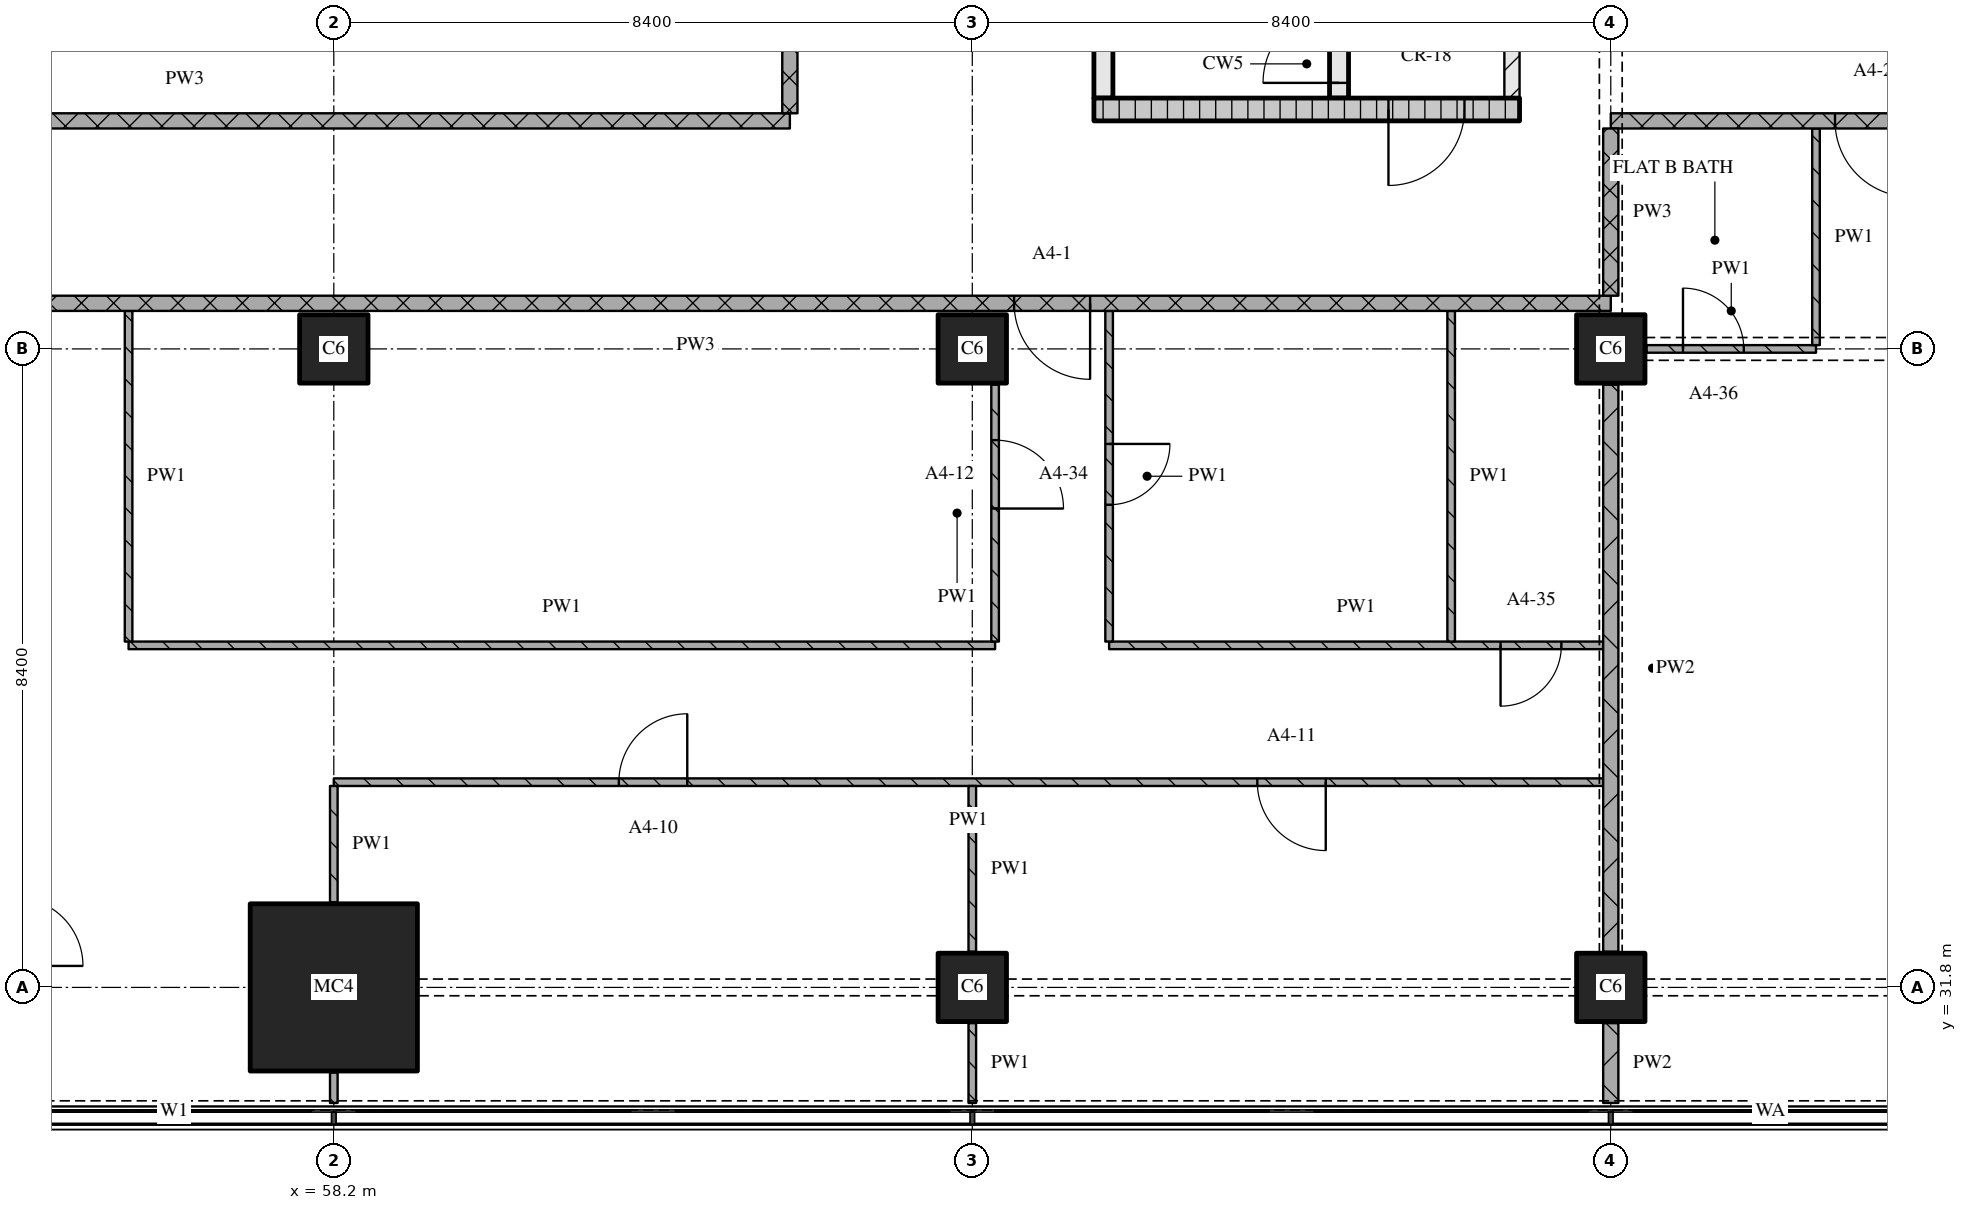
"""IFC4 building model, lengths in metres.
Left out: names, types, materials, properties, quantities, classifications, styles, units other than length and angle.
Written with IfcOpenShell. Run it as: python <this file> out.ifc"""

import sys

from ifc_helpers import new_model, si_unit, direction, frame, frame_2d, origin, origin_2d, place, context, subcontext, project, spatial, rectangle, extrude, element, fill, save


model = new_model("IFC4")
c1 = context("Model", 3, precision=1e-05, world=origin(), true_north=direction((0.0, 1.0)))
c2 = subcontext(c1, "Body", "Model", "MODEL_VIEW")
j1 = project(units=[si_unit("LENGTHUNIT", "METRE"), si_unit("PLANEANGLEUNIT", "RADIAN")], contexts=[c1])
p1 = place(None, origin())
s1 = spatial("IfcSite", under=j1, at=p1, CompositionType="ELEMENT")
p2 = place(p1, origin())
s2 = spatial("IfcBuilding", under=s1, at=p2, CompositionType="ELEMENT")
p3 = place(p2, frame((0.0, 0.0, 73.2)))
s3 = spatial("IfcBuildingStorey", under=s2, at=p3, CompositionType="ELEMENT", Elevation=73.2)
p4 = place(p3, frame((58.2, 31.8, 0.0), z_axis=(0.0, 0.0, 1.0), x_axis=(1.0, 0.0, 0.0)))
e1 = element("IfcColumn", 1, at=p4, inside=s3, PredefinedType="COLUMN", context=c2, shape_type="SweptSolid", body=[
    extrude(rectangle(XDim=2.2, YDim=2.2, at=origin_2d()), origin(), (0.0, 0.0, 1.0), 3.6),
])
for number, where, z_axis, x_axis in (
    (2, (58.2, 40.2, 0.0), (0.0, 0.0, 1.0), (1.0, 0.0, 0.0)),
    (3, (66.6, 31.8, 0.0), (0.0, 0.0, 1.0), (1.0, 0.0, 0.0)),
    (4, (66.6, 40.2, 0.0), (0.0, 0.0, 1.0), (1.0, 0.0, 0.0)),
    (5, (75.0, 31.8, 0.0), (0.0, 0.0, 1.0), (1.0, 0.0, 0.0)),
    (6, (75.0, 40.2, 0.0), (0.0, 0.0, 1.0), (1.0, 0.0, 0.0)),
):
    element("IfcColumn", number, at=place(p3, frame(where, z_axis=z_axis, x_axis=x_axis)), inside=s3, PredefinedType="COLUMN", context=c2, shape_type="SweptSolid", body=[
        extrude(rectangle(XDim=0.9, YDim=0.9, at=origin_2d()), origin(), (0.0, 0.0, 1.0), 3.6),
    ])
p5 = place(p3, frame((68.2, 43.35, 0.0), z_axis=(0.0, 0.0, 1.0), x_axis=(1.0, 0.0, 0.0)))
e7 = element("IfcWall", 7, at=p5, inside=s3, PredefinedType="SOLIDWALL", context=c2, shape_type="SweptSolid", body=[
    extrude(rectangle(XDim=5.6, YDim=0.3, at=frame_2d((2.8, 0.0))), origin(), (0.0, 0.0, 1.0), 3.32),
])
p6 = place(p5, frame((3.875, 0.0, 0.0)))
e8 = element("IfcOpeningElement", 8, at=p6, cuts=e7, PredefinedType="OPENING", context=c2, shape_type="SweptSolid", body=[
    extrude(rectangle(XDim=1.0, YDim=2.1, at=frame_2d((0.5, 1.05))), frame((0.0, 0.16, 0.0), z_axis=(0.0, -1.0, 0.0), x_axis=(1.0, 0.0, 0.0)), (0.0, 0.0, 1.0), 0.32),
])
p7 = place(p3, frame((68.325, 43.5, 0.0), z_axis=(0.0, 0.0, 1.0), x_axis=(0.0, 1.0, 0.0)))
e9 = element("IfcWall", 9, at=p7, inside=s3, PredefinedType="SOLIDWALL", context=c2, shape_type="SweptSolid", body=[
    extrude(rectangle(XDim=6.9, YDim=0.25, at=frame_2d((3.45, 0.0))), origin(), (0.0, 0.0, 1.0), 3.32),
])
p8 = place(p3, frame((71.425, 43.5, 0.0), z_axis=(0.0, 0.0, 1.0), x_axis=(0.0, 1.0, 0.0)))
e10 = element("IfcWall", 10, at=p8, inside=s3, PredefinedType="SOLIDWALL", context=c2, shape_type="SweptSolid", body=[
    extrude(rectangle(XDim=6.9, YDim=0.25, at=frame_2d((3.45, 0.0))), origin(), (0.0, 0.0, 1.0), 3.32),
])
p9 = place(p8, frame((0.2, 0.0, 0.0)))
e11 = element("IfcOpeningElement", 11, at=p9, cuts=e10, PredefinedType="OPENING", context=c2, shape_type="SweptSolid", body=[
    extrude(rectangle(XDim=1.0, YDim=2.1, at=frame_2d((0.5, 1.05))), frame((0.0, 0.135, 0.0), z_axis=(0.0, -1.0, 0.0), x_axis=(1.0, 0.0, 0.0)), (0.0, 0.0, 1.0), 0.27),
])
p10 = place(p3, frame((73.7, 43.5, 0.0), z_axis=(0.0, 0.0, 1.0), x_axis=(0.0, 1.0, 0.0)))
e12 = element("IfcWall", 12, at=p10, inside=s3, PredefinedType="PARTITIONING", context=c2, shape_type="SweptSolid", body=[
    extrude(rectangle(XDim=6.9, YDim=0.2, at=frame_2d((3.45, 0.0))), origin(), (0.0, 0.0, 1.0), 3.32),
])
p11 = place(p10, frame((1.0, 0.0, 0.0)))
e13 = element("IfcOpeningElement", 13, at=p11, cuts=e12, PredefinedType="OPENING", context=c2, shape_type="SweptSolid", body=[
    extrude(rectangle(XDim=1.0, YDim=2.1, at=frame_2d((0.5, 1.05))), frame((0.0, 0.11, 0.0), z_axis=(0.0, -1.0, 0.0), x_axis=(1.0, 0.0, 0.0)), (0.0, 0.0, 1.0), 0.22),
])
p12 = place(p3, frame((74.9, 34.5, 0.0), z_axis=(0.0, 0.0, 1.0), x_axis=(-1.0, 0.0, 0.0)))
e14 = element("IfcWall", 14, at=p12, inside=s3, PredefinedType="PARTITIONING", context=c2, shape_type="SweptSolid", body=[
    extrude(rectangle(XDim=16.7, YDim=0.1, at=frame_2d((8.35, 0.0))), origin(), (0.0, 0.0, 1.0), 3.32),
])
p13 = place(p12, frame((3.65, 0.0, 0.0)))
e15 = element("IfcOpeningElement", 15, at=p13, cuts=e14, PredefinedType="OPENING", context=c2, shape_type="SweptSolid", body=[
    extrude(rectangle(XDim=0.9, YDim=2.1, at=frame_2d((0.45, 1.05))), frame((0.0, 0.06, 0.0), z_axis=(0.0, -1.0, 0.0), x_axis=(1.0, 0.0, 0.0)), (0.0, 0.0, 1.0), 0.12),
])
p14 = place(p12, frame((12.05, 0.0, 0.0)))
e16 = element("IfcOpeningElement", 16, at=p14, cuts=e14, PredefinedType="OPENING", context=c2, shape_type="SweptSolid", body=[
    extrude(rectangle(XDim=0.9, YDim=2.1, at=frame_2d((0.45, 1.05))), frame((0.0, 0.06, 0.0), z_axis=(0.0, -1.0, 0.0), x_axis=(1.0, 0.0, 0.0)), (0.0, 0.0, 1.0), 0.12),
])
p15 = place(p3, frame((55.5, 36.3, 0.0), z_axis=(0.0, 0.0, 1.0), x_axis=(1.0, 0.0, 0.0)))
e17 = element("IfcWall", 17, at=p15, inside=s3, PredefinedType="PARTITIONING", context=c2, shape_type="SweptSolid", body=[
    extrude(rectangle(XDim=11.4, YDim=0.1, at=frame_2d((5.7, 0.0))), origin(), (0.0, 0.0, 1.0), 3.32),
])
p16 = place(p3, frame((68.4, 36.3, 0.0), z_axis=(0.0, 0.0, 1.0), x_axis=(1.0, 0.0, 0.0)))
e18 = element("IfcWall", 18, at=p16, inside=s3, PredefinedType="PARTITIONING", context=c2, shape_type="SweptSolid", body=[
    extrude(rectangle(XDim=6.5, YDim=0.1, at=frame_2d((3.25, 0.0))), origin(), (0.0, 0.0, 1.0), 3.32),
])
p17 = place(p16, frame((5.15, 0.0, 0.0)))
e19 = element("IfcOpeningElement", 19, at=p17, cuts=e18, PredefinedType="OPENING", context=c2, shape_type="SweptSolid", body=[
    extrude(rectangle(XDim=0.8, YDim=2.1, at=frame_2d((0.4, 1.05))), frame((0.0, 0.06, 0.0), z_axis=(0.0, -1.0, 0.0), x_axis=(1.0, 0.0, 0.0)), (0.0, 0.0, 1.0), 0.12),
])
p18 = place(p3, frame((75.47, 40.2, 0.0), z_axis=(0.0, 0.0, 1.0), x_axis=(1.0, 0.0, 0.0)))
e20 = element("IfcWall", 20, at=p18, inside=s3, PredefinedType="PARTITIONING", context=c2, shape_type="SweptSolid", body=[
    extrude(rectangle(XDim=2.23, YDim=0.1, at=frame_2d((1.115, 0.0))), origin(), (0.0, 0.0, 1.0), 2.83),
])
p19 = place(p18, frame((0.48, 0.0, 0.0)))
e21 = element("IfcOpeningElement", 21, at=p19, cuts=e20, PredefinedType="OPENING", context=c2, shape_type="SweptSolid", body=[
    extrude(rectangle(XDim=0.8, YDim=2.1, at=frame_2d((0.4, 1.05))), frame((0.0, 0.06, 0.0), z_axis=(0.0, -1.0, 0.0), x_axis=(1.0, 0.0, 0.0)), (0.0, 0.0, 1.0), 0.12),
])
p20 = place(p3, frame((75.0, 40.8, 0.0), z_axis=(0.0, 0.0, 1.0), x_axis=(-1.0, 0.0, 0.0)))
e22 = element("IfcWall", 22, at=p20, inside=s3, PredefinedType="PARTITIONING", context=c2, shape_type="SweptSolid", body=[
    extrude(rectangle(XDim=24.08, YDim=0.2, at=frame_2d((12.04, 0.0))), origin(), (0.0, 0.0, 1.0), 3.32),
])
p21 = place(p20, frame((6.85, 0.0, 0.0)))
e23 = element("IfcOpeningElement", 23, at=p21, cuts=e22, PredefinedType="OPENING", context=c2, shape_type="SweptSolid", body=[
    extrude(rectangle(XDim=1.0, YDim=2.1, at=frame_2d((0.5, 1.05))), frame((0.0, 0.11, 0.0), z_axis=(0.0, -1.0, 0.0), x_axis=(1.0, 0.0, 0.0)), (0.0, 0.0, 1.0), 0.22),
])
p22 = place(p3, frame((48.28, 43.2, 0.0), z_axis=(0.0, 0.0, 1.0), x_axis=(1.0, 0.0, 0.0)))
e24 = element("IfcWall", 24, at=p22, inside=s3, PredefinedType="PARTITIONING", context=c2, shape_type="SweptSolid", body=[
    extrude(rectangle(XDim=15.92, YDim=0.2, at=frame_2d((7.96, 0.0))), origin(), (0.0, 0.0, 1.0), 3.32),
])
p23 = place(p3, frame((100.2, 43.2, 0.0), z_axis=(0.0, 0.0, 1.0), x_axis=(-1.0, 0.0, 0.0)))
e25 = element("IfcWall", 25, at=p23, inside=s3, PredefinedType="PARTITIONING", context=c2, shape_type="SweptSolid", body=[
    extrude(rectangle(XDim=25.2, YDim=0.2, at=frame_2d((12.6, 0.0))), origin(), (0.0, 0.0, 1.0), 3.32),
])
p24 = place(p23, frame((5.95, 0.0, 0.0)))
e26 = element("IfcOpeningElement", 26, at=p24, cuts=e25, PredefinedType="OPENING", context=c2, shape_type="SweptSolid", body=[
    extrude(rectangle(XDim=1.0, YDim=2.1, at=frame_2d((0.5, 1.05))), frame((0.0, 0.11, 0.0), z_axis=(0.0, -1.0, 0.0), x_axis=(1.0, 0.0, 0.0)), (0.0, 0.0, 1.0), 0.22),
])
p25 = place(p23, frame((21.25, 0.0, 0.0)))
e27 = element("IfcOpeningElement", 27, at=p25, cuts=e25, PredefinedType="OPENING", context=c2, shape_type="SweptSolid", body=[
    extrude(rectangle(XDim=1.0, YDim=2.1, at=frame_2d((0.5, 1.05))), frame((0.0, 0.11, 0.0), z_axis=(0.0, -1.0, 0.0), x_axis=(1.0, 0.0, 0.0)), (0.0, 0.0, 1.0), 0.22),
])
p26 = place(p3, frame((55.5, 40.7, 0.0), z_axis=(0.0, 0.0, 1.0), x_axis=(0.0, -1.0, 0.0)))
e28 = element("IfcWall", 28, at=p26, inside=s3, PredefinedType="PARTITIONING", context=c2, shape_type="SweptSolid", body=[
    extrude(rectangle(XDim=4.35, YDim=0.1, at=frame_2d((2.175, 0.0))), origin(), (0.0, 0.0, 1.0), 3.32),
])
p27 = place(p3, frame((58.2, 30.68, 0.0), z_axis=(0.0, 0.0, 1.0), x_axis=(0.0, -1.0, 0.0)))
e29 = element("IfcWall", 29, at=p27, inside=s3, PredefinedType="PARTITIONING", context=c2, shape_type="SweptSolid", body=[
    extrude(rectangle(XDim=0.4, YDim=0.1, at=frame_2d((0.2, 0.0))), origin(), (0.0, 0.0, 1.0), 3.32),
])
p28 = place(p3, frame((58.2, 34.45, 0.0), z_axis=(0.0, 0.0, 1.0), x_axis=(0.0, -1.0, 0.0)))
e30 = element("IfcWall", 30, at=p28, inside=s3, PredefinedType="PARTITIONING", context=c2, shape_type="SweptSolid", body=[
    extrude(rectangle(XDim=1.53, YDim=0.1, at=frame_2d((0.765, 0.0))), origin(), (0.0, 0.0, 1.0), 3.32),
])
p29 = place(p3, frame((64.2, 43.3, 0.0), z_axis=(0.0, 0.0, 1.0), x_axis=(0.0, 1.0, 0.0)))
e31 = element("IfcWall", 31, at=p29, inside=s3, PredefinedType="PARTITIONING", context=c2, shape_type="SweptSolid", body=[
    extrude(rectangle(XDim=32.02, YDim=0.2, at=frame_2d((16.01, 0.0))), origin(), (0.0, 0.0, 1.0), 3.32),
])
p30 = place(p29, frame((9.15, 0.0, 0.0)))
e32 = element("IfcOpeningElement", 32, at=p30, cuts=e31, PredefinedType="OPENING", context=c2, shape_type="SweptSolid", body=[
    extrude(rectangle(XDim=1.0, YDim=2.1, at=frame_2d((0.5, 1.05))), frame((0.0, 0.11, 0.0), z_axis=(0.0, -1.0, 0.0), x_axis=(1.0, 0.0, 0.0)), (0.0, 0.0, 1.0), 0.22),
])
p31 = place(p29, frame((18.45, 0.0, 0.0)))
e33 = element("IfcOpeningElement", 33, at=p31, cuts=e31, PredefinedType="OPENING", context=c2, shape_type="SweptSolid", body=[
    extrude(rectangle(XDim=1.0, YDim=2.1, at=frame_2d((0.5, 1.05))), frame((0.0, 0.11, 0.0), z_axis=(0.0, -1.0, 0.0), x_axis=(1.0, 0.0, 0.0)), (0.0, 0.0, 1.0), 0.22),
])
p32 = place(p3, frame((66.6, 31.33, 0.0), z_axis=(0.0, 0.0, 1.0), x_axis=(0.0, -1.0, 0.0)))
e34 = element("IfcWall", 34, at=p32, inside=s3, PredefinedType="PARTITIONING", context=c2, shape_type="SweptSolid", body=[
    extrude(rectangle(XDim=1.05, YDim=0.1, at=frame_2d((0.525, 0.0))), origin(), (0.0, 0.0, 1.0), 3.32),
])
p33 = place(p3, frame((66.6, 34.45, 0.0), z_axis=(0.0, 0.0, 1.0), x_axis=(0.0, -1.0, 0.0)))
e35 = element("IfcWall", 35, at=p33, inside=s3, PredefinedType="PARTITIONING", context=c2, shape_type="SweptSolid", body=[
    extrude(rectangle(XDim=2.18, YDim=0.1, at=frame_2d((1.09, 0.0))), origin(), (0.0, 0.0, 1.0), 3.32),
])
p34 = place(p3, frame((66.9, 36.35, 0.0), z_axis=(0.0, 0.0, 1.0), x_axis=(0.0, 1.0, 0.0)))
e36 = element("IfcWall", 36, at=p34, inside=s3, PredefinedType="PARTITIONING", context=c2, shape_type="SweptSolid", body=[
    extrude(rectangle(XDim=3.38, YDim=0.1, at=frame_2d((1.69, 0.0))), origin(), (0.0, 0.0, 1.0), 3.32),
])
p35 = place(p34, frame((1.75, 0.0, 0.0)))
e37 = element("IfcOpeningElement", 37, at=p35, cuts=e36, PredefinedType="OPENING", context=c2, shape_type="SweptSolid", body=[
    extrude(rectangle(XDim=0.9, YDim=2.1, at=frame_2d((0.45, 1.05))), frame((0.0, 0.06, 0.0), z_axis=(0.0, -1.0, 0.0), x_axis=(1.0, 0.0, 0.0)), (0.0, 0.0, 1.0), 0.12),
])
p36 = place(p3, frame((68.4, 40.7, 0.0), z_axis=(0.0, 0.0, 1.0), x_axis=(0.0, -1.0, 0.0)))
e38 = element("IfcWall", 38, at=p36, inside=s3, PredefinedType="PARTITIONING", context=c2, shape_type="SweptSolid", body=[
    extrude(rectangle(XDim=4.35, YDim=0.1, at=frame_2d((2.175, 0.0))), origin(), (0.0, 0.0, 1.0), 3.32),
])
p37 = place(p36, frame((1.75, 0.0, 0.0)))
e39 = element("IfcOpeningElement", 39, at=p37, cuts=e38, PredefinedType="OPENING", context=c2, shape_type="SweptSolid", body=[
    extrude(rectangle(XDim=0.8, YDim=2.1, at=frame_2d((0.4, 1.05))), frame((0.0, 0.06, 0.0), z_axis=(0.0, -1.0, 0.0), x_axis=(1.0, 0.0, 0.0)), (0.0, 0.0, 1.0), 0.12),
])
p38 = place(p3, frame((72.9, 40.7, 0.0), z_axis=(0.0, 0.0, 1.0), x_axis=(0.0, -1.0, 0.0)))
e40 = element("IfcWall", 40, at=p38, inside=s3, PredefinedType="PARTITIONING", context=c2, shape_type="SweptSolid", body=[
    extrude(rectangle(XDim=4.35, YDim=0.1, at=frame_2d((2.175, 0.0))), origin(), (0.0, 0.0, 1.0), 3.32),
])
p39 = place(p3, frame((75.0, 43.1, 0.0), z_axis=(0.0, 0.0, 1.0), x_axis=(0.0, -1.0, 0.0)))
e41 = element("IfcWall", 41, at=p39, inside=s3, PredefinedType="PARTITIONING", context=c2, shape_type="SweptSolid", body=[
    extrude(rectangle(XDim=2.2, YDim=0.2, at=frame_2d((1.1, 0.0))), origin(), (0.0, 0.0, 1.0), 2.43),
])
p40 = place(p3, frame((75.0, 31.33, 0.0), z_axis=(0.0, 0.0, 1.0), x_axis=(0.0, -1.0, 0.0)))
e42 = element("IfcWall", 42, at=p40, inside=s3, PredefinedType="PARTITIONING", context=c2, shape_type="SweptSolid", body=[
    extrude(rectangle(XDim=1.05, YDim=0.2, at=frame_2d((0.525, 0.0))), origin(), (0.0, 0.0, 1.0), 3.32),
])
p41 = place(p3, frame((75.0, 39.73, 0.0), z_axis=(0.0, 0.0, 1.0), x_axis=(0.0, -1.0, 0.0)))
e43 = element("IfcWall", 43, at=p41, inside=s3, PredefinedType="PARTITIONING", context=c2, shape_type="SweptSolid", body=[
    extrude(rectangle(XDim=7.46, YDim=0.2, at=frame_2d((3.73, 0.0))), origin(), (0.0, 0.0, 1.0), 2.83),
])
p42 = place(p3, frame((77.7, 43.1, 0.0), z_axis=(0.0, 0.0, 1.0), x_axis=(0.0, -1.0, 0.0)))
e44 = element("IfcWall", 44, at=p42, inside=s3, PredefinedType="PARTITIONING", context=c2, shape_type="SweptSolid", body=[
    extrude(rectangle(XDim=2.85, YDim=0.1, at=frame_2d((1.425, 0.0))), origin(), (0.0, 0.0, 1.0), 3.32),
])
p43 = place(p6, origin())
e45 = element("IfcDoor", 45, at=p43, inside=s3, OperationType="SINGLE_SWING_RIGHT", PredefinedType="DOOR", context=c2, shape_type="SweptSolid", body=[
    extrude(rectangle(XDim=1.0, YDim=2.1, at=frame_2d((0.5, 1.05))), frame((0.0, 0.025, 0.0), z_axis=(0.0, -1.0, 0.0), x_axis=(1.0, 0.0, 0.0)), (0.0, 0.0, 1.0), 0.05),
])
fill(e8, e45)
p44 = place(p9, origin())
e46 = element("IfcDoor", 46, at=p44, inside=s3, OperationType="SINGLE_SWING_LEFT", PredefinedType="DOOR", context=c2, shape_type="SweptSolid", body=[
    extrude(rectangle(XDim=1.0, YDim=2.1, at=frame_2d((0.5, 1.05))), frame((0.0, 0.025, 0.0), z_axis=(0.0, -1.0, 0.0), x_axis=(1.0, 0.0, 0.0)), (0.0, 0.0, 1.0), 0.05),
])
fill(e11, e46)
p45 = place(p13, origin())
e47 = element("IfcDoor", 47, at=p45, inside=s3, OperationType="SINGLE_SWING_LEFT", PredefinedType="DOOR", context=c2, shape_type="SweptSolid", body=[
    extrude(rectangle(XDim=0.9, YDim=2.1, at=frame_2d((0.45, 1.05))), frame((0.0, 0.025, 0.0), z_axis=(0.0, -1.0, 0.0), x_axis=(1.0, 0.0, 0.0)), (0.0, 0.0, 1.0), 0.05),
])
fill(e15, e47)
p46 = place(p14, origin())
e48 = element("IfcDoor", 48, at=p46, inside=s3, OperationType="SINGLE_SWING_RIGHT", PredefinedType="DOOR", context=c2, shape_type="SweptSolid", body=[
    extrude(rectangle(XDim=0.9, YDim=2.1, at=frame_2d((0.45, 1.05))), frame((0.0, 0.025, 0.0), z_axis=(0.0, -1.0, 0.0), x_axis=(1.0, 0.0, 0.0)), (0.0, 0.0, 1.0), 0.05),
])
fill(e16, e48)
p47 = place(p17, origin())
e49 = element("IfcDoor", 49, at=p47, inside=s3, OperationType="SINGLE_SWING_RIGHT", PredefinedType="DOOR", context=c2, shape_type="SweptSolid", body=[
    extrude(rectangle(XDim=0.8, YDim=2.1, at=frame_2d((0.4, 1.05))), frame((0.0, 0.025, 0.0), z_axis=(0.0, -1.0, 0.0), x_axis=(1.0, 0.0, 0.0)), (0.0, 0.0, 1.0), 0.05),
])
fill(e19, e49)
p48 = place(p19, origin())
e50 = element("IfcDoor", 50, at=p48, inside=s3, OperationType="SINGLE_SWING_LEFT", PredefinedType="DOOR", context=c2, shape_type="SweptSolid", body=[
    extrude(rectangle(XDim=0.8, YDim=2.1, at=frame_2d((0.4, 1.05))), frame((0.0, 0.025, 0.0), z_axis=(0.0, -1.0, 0.0), x_axis=(1.0, 0.0, 0.0)), (0.0, 0.0, 1.0), 0.05),
])
fill(e21, e50)
p49 = place(p21, origin())
e51 = element("IfcDoor", 51, at=p49, inside=s3, OperationType="SINGLE_SWING_LEFT", PredefinedType="DOOR", context=c2, shape_type="SweptSolid", body=[
    extrude(rectangle(XDim=1.0, YDim=2.1, at=frame_2d((0.5, 1.05))), frame((0.0, 0.025, 0.0), z_axis=(0.0, -1.0, 0.0), x_axis=(1.0, 0.0, 0.0)), (0.0, 0.0, 1.0), 0.05),
])
fill(e23, e51)
p50 = place(p25, origin())
e52 = element("IfcDoor", 52, at=p50, inside=s3, OperationType="SINGLE_SWING_LEFT", PredefinedType="DOOR", context=c2, shape_type="SweptSolid", body=[
    extrude(rectangle(XDim=1.0, YDim=2.1, at=frame_2d((0.5, 1.05))), frame((0.0, 0.025, 0.0), z_axis=(0.0, -1.0, 0.0), x_axis=(1.0, 0.0, 0.0)), (0.0, 0.0, 1.0), 0.05),
])
fill(e27, e52)
p51 = place(p35, origin())
e53 = element("IfcDoor", 53, at=p51, inside=s3, OperationType="SINGLE_SWING_RIGHT", PredefinedType="DOOR", context=c2, shape_type="SweptSolid", body=[
    extrude(rectangle(XDim=0.9, YDim=2.1, at=frame_2d((0.45, 1.05))), frame((0.0, 0.025, 0.0), z_axis=(0.0, -1.0, 0.0), x_axis=(1.0, 0.0, 0.0)), (0.0, 0.0, 1.0), 0.05),
])
fill(e37, e53)
p52 = place(p37, origin())
e54 = element("IfcDoor", 54, at=p52, inside=s3, OperationType="SINGLE_SWING_LEFT", PredefinedType="DOOR", context=c2, shape_type="SweptSolid", body=[
    extrude(rectangle(XDim=0.8, YDim=2.1, at=frame_2d((0.4, 1.05))), frame((0.0, 0.025, 0.0), z_axis=(0.0, -1.0, 0.0), x_axis=(1.0, 0.0, 0.0)), (0.0, 0.0, 1.0), 0.05),
])
fill(e39, e54)
save(model, sys.argv[1])
